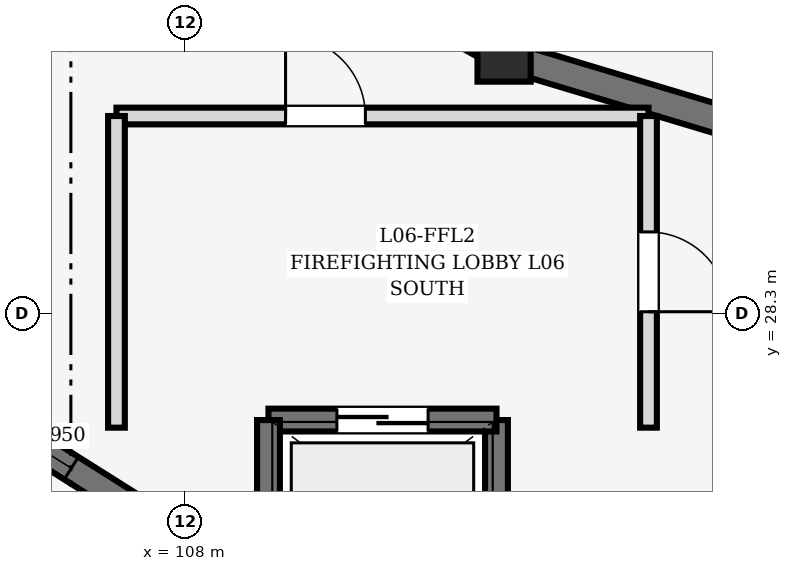
"""IFC4 building model, lengths in metres.
Left out: names, types, materials, properties, quantities, classifications, styles, units other than length and angle.
Written with IfcOpenShell. Run it as: python <this file> out.ifc"""

import sys

from ifc_helpers import new_model, si_unit, direction, frame, frame_2d, origin, origin_2d, place, context, subcontext, project, spatial, rectangle, extrude, element, fill, save


model = new_model("IFC4")
c1 = context("Model", 3, precision=1e-05, world=origin(), true_north=direction((0.0, 1.0)))
c2 = subcontext(c1, "Body", "Model", "MODEL_VIEW")
j1 = project(units=[si_unit("LENGTHUNIT", "METRE"), si_unit("PLANEANGLEUNIT", "RADIAN")], contexts=[c1])
p1 = place(None, origin())
s1 = spatial("IfcSite", under=j1, at=p1, CompositionType="ELEMENT")
p2 = place(p1, origin())
s2 = spatial("IfcBuilding", under=s1, at=p2, CompositionType="ELEMENT")
p3 = place(p2, frame((0.0, 0.0, 23.7)))
s3 = spatial("IfcBuildingStorey", under=s2, at=p3, CompositionType="ELEMENT", Elevation=23.7)
p4 = place(p3, frame((112.2, 31.702, 0.0), z_axis=(0.0, 0.0, 1.0), x_axis=(1.0, 0.0, 0.0)))
e1 = element("IfcColumn", 1, at=p4, inside=s3, PredefinedType="COLUMN", context=c2, shape_type="SweptSolid", body=[
    extrude(rectangle(XDim=0.7, YDim=0.7, at=origin_2d()), origin(), (0.0, 0.0, 1.0), 4.5),
])
p5 = place(p3, frame((108.39, 33.821, 0.0), z_axis=(0.0, 0.0, 1.0), x_axis=(0.87401308715, -0.485902380618, 0.0)))
e2 = element("IfcWall", 2, at=p5, inside=s3, PredefinedType="SOLIDWALL", context=c2, shape_type="SweptSolid", body=[
    extrude(rectangle(XDim=4.074, YDim=0.38, at=frame_2d((2.037, 0.0))), origin(), (0.0, 0.0, 1.0), 4.5),
])
p6 = place(p5, frame((1.507, 0.0, 0.0)))
e3 = element("IfcOpeningElement", 3, at=p6, cuts=e2, PredefinedType="OPENING", context=c2, shape_type="SweptSolid", body=[
    extrude(rectangle(XDim=1.06, YDim=2.24, at=frame_2d((0.53, 1.12))), frame((0.0, 0.202, 0.0), z_axis=(0.0, -1.0, 0.0), x_axis=(1.0, 0.0, 0.0)), (0.0, 0.0, 1.0), 0.404),
])
p7 = place(p3, frame((103.312, 28.279, 0.0), z_axis=(0.0, 0.0, 1.0), x_axis=(0.846132783073, -0.532972150688, 0.0)))
e4 = element("IfcWall", 4, at=p7, inside=s3, PredefinedType="SHEAR", context=c2, shape_type="SweptSolid", body=[
    extrude(rectangle(XDim=5.95, YDim=0.35, at=frame_2d((2.975, 0.0))), origin(), (0.0, 0.0, 1.0), 3.5),
])
p8 = place(p7, frame((2.175, 0.0, 2.25)))
e5 = element("IfcOpeningElement", 5, at=p8, cuts=e4, PredefinedType="OPENING", context=c2, shape_type="SweptSolid", body=[
    extrude(rectangle(XDim=1.6, YDim=0.9, at=frame_2d((0.8, 0.45))), frame((0.0, 0.187, 0.0), z_axis=(0.0, -1.0, 0.0), x_axis=(1.0, 0.0, 0.0)), (0.0, 0.0, 1.0), 0.374),
])
p9 = place(p3, frame((112.473, 31.621, 0.0), z_axis=(0.0, 0.0, 1.0), x_axis=(0.957792414988, -0.287460762177, 0.0)))
e6 = element("IfcWall", 6, at=p9, inside=s3, PredefinedType="SOLIDWALL", context=c2, shape_type="SweptSolid", body=[
    extrude(rectangle(XDim=4.365, YDim=0.38, at=frame_2d((2.183, 0.0))), origin(), (0.0, 0.0, 1.0), 4.5),
])
p10 = place(p3, frame((112.1, 26.9, 0.0), z_axis=(0.0, 0.0, 1.0), x_axis=(0.0, -1.0, 0.0)))
e7 = element("IfcWall", 7, at=p10, inside=s3, PredefinedType="SHEAR", context=c2, shape_type="SweptSolid", body=[
    extrude(rectangle(XDim=2.2, YDim=0.3, at=frame_2d((1.1, 0.0))), origin(), (0.0, 0.0, 1.0), 4.5),
])
p11 = place(p3, frame((109.1, 26.9, 0.0), z_axis=(0.0, 0.0, 1.0), x_axis=(1.0, 0.0, 0.0)))
e8 = element("IfcWall", 8, at=p11, inside=s3, PredefinedType="SHEAR", context=c2, shape_type="SweptSolid", body=[
    extrude(rectangle(XDim=3.0, YDim=0.3, at=frame_2d((1.5, 0.0))), origin(), (0.0, 0.0, 1.0), 4.5),
])
p12 = place(p11, frame((0.9, 0.0, 0.0)))
e9 = element("IfcOpeningElement", 9, at=p12, cuts=e8, PredefinedType="OPENING", context=c2, shape_type="SweptSolid", body=[
    extrude(rectangle(XDim=1.2, YDim=2.15, at=frame_2d((0.6, 1.075))), frame((0.0, 0.162, 0.0), z_axis=(0.0, -1.0, 0.0), x_axis=(1.0, 0.0, 0.0)), (0.0, 0.0, 1.0), 0.324),
])
p13 = place(p3, frame((109.1, 24.7, 0.0), z_axis=(0.0, 0.0, 1.0), x_axis=(0.0, 1.0, 0.0)))
e10 = element("IfcWall", 10, at=p13, inside=s3, PredefinedType="SHEAR", context=c2, shape_type="SweptSolid", body=[
    extrude(rectangle(XDim=2.2, YDim=0.3, at=frame_2d((1.1, 0.0))), origin(), (0.0, 0.0, 1.0), 4.5),
])
p14 = place(p3, frame((107.1, 30.9, 0.0), z_axis=(0.0, 0.0, 1.0), x_axis=(1.0, 0.0, 0.0)))
e11 = element("IfcWall", 11, at=p14, inside=s3, PredefinedType="SOLIDWALL", context=c2, shape_type="SweptSolid", body=[
    extrude(rectangle(XDim=7.0, YDim=0.22, at=frame_2d((3.5, 0.0))), origin(), (0.0, 0.0, 1.0), 4.485),
])
p15 = place(p14, frame((2.225, 0.0, 0.0)))
e12 = element("IfcOpeningElement", 12, at=p15, cuts=e11, PredefinedType="OPENING", context=c2, shape_type="SweptSolid", body=[
    extrude(rectangle(XDim=1.05, YDim=2.15, at=frame_2d((0.525, 1.075))), frame((0.0, 0.122, 0.0), z_axis=(0.0, -1.0, 0.0), x_axis=(1.0, 0.0, 0.0)), (0.0, 0.0, 1.0), 0.244),
])
p16 = place(p3, frame((107.1, 26.8, 0.0), z_axis=(0.0, 0.0, 1.0), x_axis=(0.0, 1.0, 0.0)))
e13 = element("IfcWall", 13, at=p16, inside=s3, PredefinedType="SOLIDWALL", context=c2, shape_type="SweptSolid", body=[
    extrude(rectangle(XDim=4.1, YDim=0.22, at=frame_2d((2.05, 0.0))), origin(), (0.0, 0.0, 1.0), 4.485),
])
p17 = place(p3, frame((114.1, 30.9, 0.0), z_axis=(0.0, 0.0, 1.0), x_axis=(0.0, -1.0, 0.0)))
e14 = element("IfcWall", 14, at=p17, inside=s3, PredefinedType="SOLIDWALL", context=c2, shape_type="SweptSolid", body=[
    extrude(rectangle(XDim=4.1, YDim=0.22, at=frame_2d((2.05, 0.0))), origin(), (0.0, 0.0, 1.0), 4.485),
])
p18 = place(p17, frame((1.525, 0.0, 0.0)))
e15 = element("IfcOpeningElement", 15, at=p18, cuts=e14, PredefinedType="OPENING", context=c2, shape_type="SweptSolid", body=[
    extrude(rectangle(XDim=1.05, YDim=2.15, at=frame_2d((0.525, 1.075))), frame((0.0, 0.122, 0.0), z_axis=(0.0, -1.0, 0.0), x_axis=(1.0, 0.0, 0.0)), (0.0, 0.0, 1.0), 0.244),
])
p19 = place(p8, origin())
e16 = element("IfcWindow", 16, at=p19, inside=s3, PartitioningType="SINGLE_PANEL", PredefinedType="SKYLIGHT", context=c2, shape_type="SweptSolid", body=[
    extrude(rectangle(XDim=1.6, YDim=0.9, at=frame_2d((0.8, 0.45))), frame((0.0, 0.03, 0.0), z_axis=(0.0, -1.0, 0.0), x_axis=(1.0, 0.0, 0.0)), (0.0, 0.0, 1.0), 0.06),
])
fill(e5, e16)
p20 = place(p12, origin())
e17 = element("IfcDoor", 17, at=p20, inside=s3, OperationType="DOUBLE_DOOR_SLIDING", PredefinedType="DOOR", context=c2, shape_type="SweptSolid", body=[
    extrude(rectangle(XDim=1.2, YDim=2.15, at=frame_2d((0.6, 1.075))), frame((0.0, 0.025, 0.0), z_axis=(0.0, -1.0, 0.0), x_axis=(1.0, 0.0, 0.0)), (0.0, 0.0, 1.0), 0.05),
])
fill(e9, e17)
p21 = place(p15, origin())
e18 = element("IfcDoor", 18, at=p21, inside=s3, OperationType="SINGLE_SWING_LEFT", PredefinedType="DOOR", context=c2, shape_type="SweptSolid", body=[
    extrude(rectangle(XDim=1.05, YDim=2.15, at=frame_2d((0.525, 1.075))), frame((0.0, 0.025, 0.0), z_axis=(0.0, -1.0, 0.0), x_axis=(1.0, 0.0, 0.0)), (0.0, 0.0, 1.0), 0.05),
])
fill(e12, e18)
p22 = place(p18, origin())
e19 = element("IfcDoor", 19, at=p22, inside=s3, OperationType="SINGLE_SWING_RIGHT", PredefinedType="DOOR", context=c2, shape_type="SweptSolid", body=[
    extrude(rectangle(XDim=1.05, YDim=2.15, at=frame_2d((0.525, 1.075))), frame((0.0, 0.025, 0.0), z_axis=(0.0, -1.0, 0.0), x_axis=(1.0, 0.0, 0.0)), (0.0, 0.0, 1.0), 0.05),
])
fill(e15, e19)
save(model, sys.argv[1])
